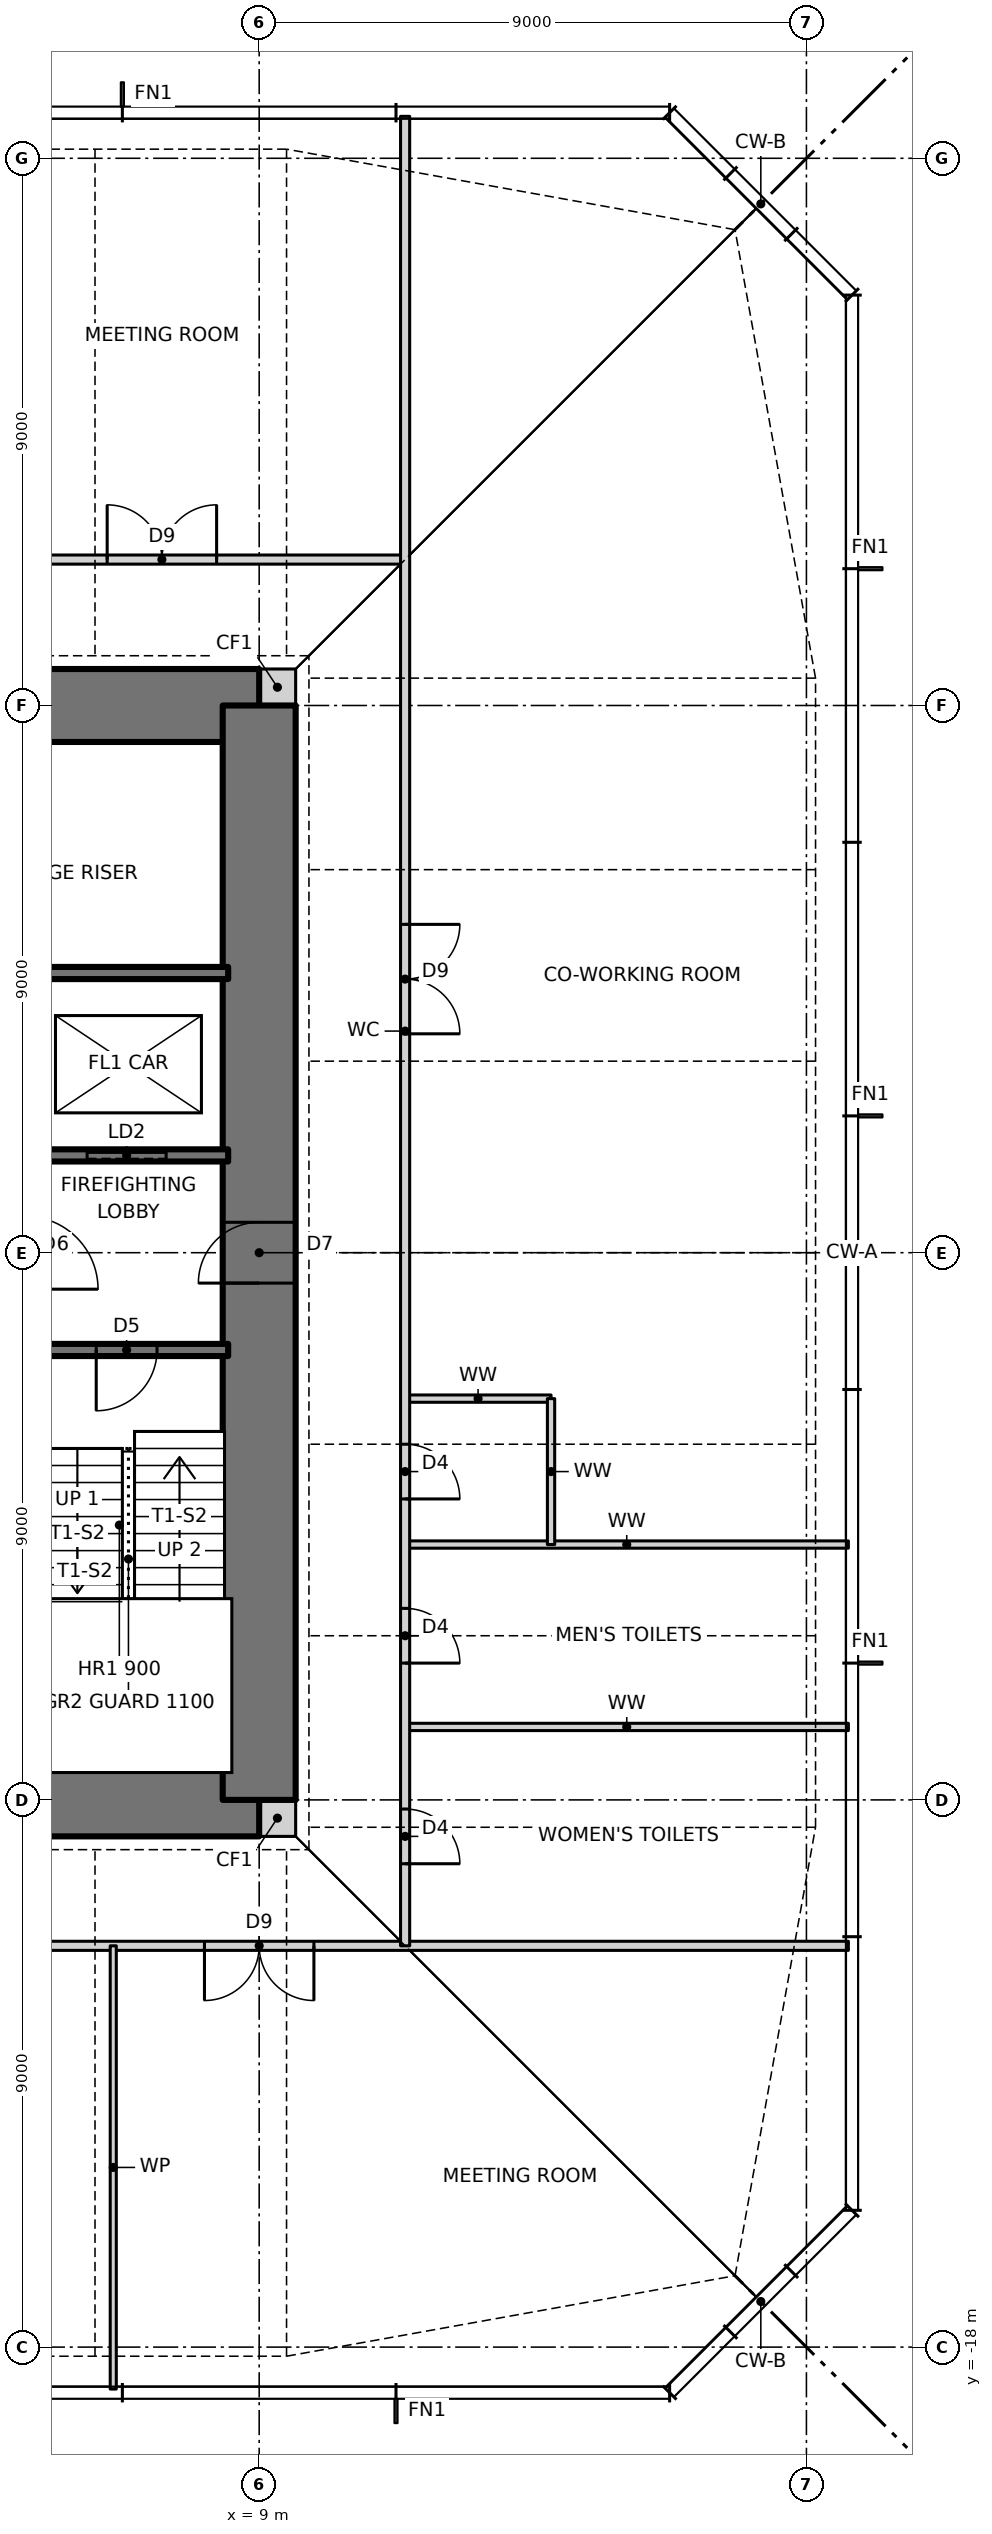
"""IFC4 building model, lengths in metres.
Left out: names, types, materials, properties, quantities, classifications, styles, units other than length and angle.
Written with IfcOpenShell. Run it as: python <this file> out.ifc"""

import sys

from ifc_helpers import new_model, si_unit, direction, frame, frame_2d, origin, place, context, subcontext, project, spatial, rectangle, extrude, element, fill, save


model = new_model("IFC4")
c1 = context("Model", 3, precision=1e-05, world=origin(), true_north=direction((0.0, 1.0)))
c2 = subcontext(c1, "Body", "Model", "MODEL_VIEW")
j1 = project(units=[si_unit("LENGTHUNIT", "METRE"), si_unit("PLANEANGLEUNIT", "RADIAN")], contexts=[c1])
p1 = place(None, origin())
s1 = spatial("IfcSite", under=j1, at=p1, CompositionType="ELEMENT")
p2 = place(p1, origin())
s2 = spatial("IfcBuilding", under=s1, at=p2, CompositionType="ELEMENT")
p3 = place(p2, frame((0.0, 0.0, 149.5)))
s3 = spatial("IfcBuildingStorey", under=s2, at=p3, CompositionType="ELEMENT", Elevation=149.5)
for number, where, z_axis, x_axis in (
    (1, (9.0, -9.3, 0.0), (0.0, 0.0, 1.0), (1.0, 0.0, 0.0)),
    (2, (9.0, 9.3, 0.0), (0.0, 0.0, 1.0), (1.0, 0.0, 0.0)),
):
    element("IfcWall", number, at=place(p3, frame(where, z_axis=z_axis, x_axis=x_axis)), inside=s3, PredefinedType="SOLIDWALL", context=c2, shape_type="SweptSolid", body=[
        extrude(rectangle(XDim=0.6, YDim=0.6, at=frame_2d((0.3, 0.0))), origin(), (0.0, 0.0, 1.0), 3.5),
    ])
p4 = place(p3, frame((-9.0, -9.0, 0.0), z_axis=(0.0, 0.0, 1.0), x_axis=(1.0, 0.0, 0.0)))
e3 = element("IfcWall", 3, at=p4, inside=s3, PredefinedType="SHEAR", context=c2, shape_type="SweptSolid", body=[
    extrude(rectangle(XDim=18.0, YDim=1.2, at=frame_2d((9.0, 0.0))), origin(), (0.0, 0.0, 1.0), 3.5),
])
p5 = place(p4, frame((3.775, 0.0, 0.0)))
e4 = element("IfcOpeningElement", 4, at=p5, cuts=e3, PredefinedType="OPENING", context=c2, shape_type="SweptSolid", body=[
    extrude(rectangle(XDim=0.9, YDim=2.1, at=frame_2d((0.45, 1.05))), frame((0.0, 0.61, 0.0), z_axis=(0.0, -1.0, 0.0), x_axis=(1.0, 0.0, 0.0)), (0.0, 0.0, 1.0), 1.22),
])
p6 = place(p4, frame((10.625, 0.0, 0.0)))
e5 = element("IfcOpeningElement", 5, at=p6, cuts=e3, PredefinedType="OPENING", context=c2, shape_type="SweptSolid", body=[
    extrude(rectangle(XDim=0.9, YDim=2.1, at=frame_2d((0.45, 1.05))), frame((0.0, 0.61, 0.0), z_axis=(0.0, -1.0, 0.0), x_axis=(1.0, 0.0, 0.0)), (0.0, 0.0, 1.0), 1.22),
])
p7 = place(p3, frame((9.0, 9.0, 0.0), z_axis=(0.0, 0.0, 1.0), x_axis=(-1.0, 0.0, 0.0)))
e6 = element("IfcWall", 6, at=p7, inside=s3, PredefinedType="SHEAR", context=c2, shape_type="SweptSolid", body=[
    extrude(rectangle(XDim=18.0, YDim=1.2, at=frame_2d((9.0, 0.0))), origin(), (0.0, 0.0, 1.0), 3.5),
])
p8 = place(p7, frame((11.125, 0.0, 0.0)))
e7 = element("IfcOpeningElement", 7, at=p8, cuts=e6, PredefinedType="OPENING", context=c2, shape_type="SweptSolid", body=[
    extrude(rectangle(XDim=0.9, YDim=2.1, at=frame_2d((0.45, 1.05))), frame((0.0, 0.61, 0.0), z_axis=(0.0, -1.0, 0.0), x_axis=(1.0, 0.0, 0.0)), (0.0, 0.0, 1.0), 1.22),
])
p9 = place(p7, frame((4.275, 0.0, 0.0)))
e8 = element("IfcOpeningElement", 8, at=p9, cuts=e6, PredefinedType="OPENING", context=c2, shape_type="SweptSolid", body=[
    extrude(rectangle(XDim=0.9, YDim=2.1, at=frame_2d((0.45, 1.05))), frame((0.0, 0.61, 0.0), z_axis=(0.0, -1.0, 0.0), x_axis=(1.0, 0.0, 0.0)), (0.0, 0.0, 1.0), 1.22),
])
p10 = place(p3, frame((9.0, -9.0, 0.0), z_axis=(0.0, 0.0, 1.0), x_axis=(0.0, 1.0, 0.0)))
e9 = element("IfcWall", 9, at=p10, inside=s3, PredefinedType="SHEAR", context=c2, shape_type="SweptSolid", body=[
    extrude(rectangle(XDim=18.0, YDim=1.2, at=frame_2d((9.0, 0.0))), origin(), (0.0, 0.0, 1.0), 3.5),
])
p11 = place(p10, frame((8.5, 0.0, 0.0)))
e10 = element("IfcOpeningElement", 10, at=p11, cuts=e9, PredefinedType="OPENING", context=c2, shape_type="SweptSolid", body=[
    extrude(rectangle(XDim=1.0, YDim=2.1, at=frame_2d((0.5, 1.05))), frame((0.0, 0.61, 0.0), z_axis=(0.0, -1.0, 0.0), x_axis=(1.0, 0.0, 0.0)), (0.0, 0.0, 1.0), 1.22),
])
p12 = place(p3, frame((-11.4, -11.4, 0.0), z_axis=(0.0, 0.0, 1.0), x_axis=(1.0, 0.0, 0.0)))
e11 = element("IfcWall", 11, at=p12, inside=s3, PredefinedType="PARTITIONING", context=c2, shape_type="SweptSolid", body=[
    extrude(rectangle(XDim=30.09, YDim=0.15, at=frame_2d((15.045, 0.0))), origin(), (0.0, 0.0, 1.0), 3.27),
])
p13 = place(p12, frame((8.1, 0.0, 0.0)))
e12 = element("IfcOpeningElement", 12, at=p13, cuts=e11, PredefinedType="OPENING", context=c2, shape_type="SweptSolid", body=[
    extrude(rectangle(XDim=1.8, YDim=2.1, at=frame_2d((0.9, 1.05))), frame((0.0, 0.085, 0.0), z_axis=(0.0, -1.0, 0.0), x_axis=(1.0, 0.0, 0.0)), (0.0, 0.0, 1.0), 0.17),
])
p14 = place(p12, frame((19.5, 0.0, 0.0)))
e13 = element("IfcOpeningElement", 13, at=p14, cuts=e11, PredefinedType="OPENING", context=c2, shape_type="SweptSolid", body=[
    extrude(rectangle(XDim=1.8, YDim=2.1, at=frame_2d((0.9, 1.05))), frame((0.0, 0.085, 0.0), z_axis=(0.0, -1.0, 0.0), x_axis=(1.0, 0.0, 0.0)), (0.0, 0.0, 1.0), 0.17),
])
for number, where, z_axis, x_axis in (
    (14, (11.4, -7.8, 0.0), (0.0, 0.0, 1.0), (1.0, 0.0, 0.0)),
    (15, (11.4, -4.8, 0.0), (0.0, 0.0, 1.0), (1.0, 0.0, 0.0)),
):
    element("IfcWall", number, at=place(p3, frame(where, z_axis=z_axis, x_axis=x_axis)), inside=s3, PredefinedType="PARTITIONING", context=c2, shape_type="SweptSolid", body=[
        extrude(rectangle(XDim=7.29, YDim=0.12, at=frame_2d((3.645, 0.0))), origin(), (0.0, 0.0, 1.0), 3.27),
    ])
p15 = place(p3, frame((11.4, -2.4, 0.0), z_axis=(0.0, 0.0, 1.0), x_axis=(1.0, 0.0, 0.0)))
e16 = element("IfcWall", 16, at=p15, inside=s3, PredefinedType="PARTITIONING", context=c2, shape_type="SweptSolid", body=[
    extrude(rectangle(XDim=2.4, YDim=0.12, at=frame_2d((1.2, 0.0))), origin(), (0.0, 0.0, 1.0), 3.27),
])
p16 = place(p3, frame((-8.49, -1.6, 0.0), z_axis=(0.0, 0.0, 1.0), x_axis=(1.0, 0.0, 0.0)))
e17 = element("IfcWall", 17, at=p16, inside=s3, PredefinedType="SOLIDWALL", context=c2, shape_type="SweptSolid", body=[
    extrude(rectangle(XDim=16.98, YDim=0.2, at=frame_2d((8.49, 0.0))), origin(), (0.0, 0.0, 1.0), 3.5),
])
p17 = place(p16, frame((14.81, 0.0, 0.0)))
e18 = element("IfcOpeningElement", 18, at=p17, cuts=e17, PredefinedType="OPENING", context=c2, shape_type="SweptSolid", body=[
    extrude(rectangle(XDim=1.0, YDim=2.1, at=frame_2d((0.5, 1.05))), frame((0.0, 0.11, 0.0), z_axis=(0.0, -1.0, 0.0), x_axis=(1.0, 0.0, 0.0)), (0.0, 0.0, 1.0), 0.22),
])
p18 = place(p16, frame((1.232, 0.0, 0.0)))
e19 = element("IfcOpeningElement", 19, at=p18, cuts=e17, PredefinedType="OPENING", context=c2, shape_type="SweptSolid", body=[
    extrude(rectangle(XDim=0.9, YDim=2.1, at=frame_2d((0.45, 1.05))), frame((0.0, 0.11, 0.0), z_axis=(0.0, -1.0, 0.0), x_axis=(1.0, 0.0, 0.0)), (0.0, 0.0, 1.0), 0.22),
])
p19 = place(p16, frame((4.627, 0.0, 0.0)))
e20 = element("IfcOpeningElement", 20, at=p19, cuts=e17, PredefinedType="OPENING", context=c2, shape_type="SweptSolid", body=[
    extrude(rectangle(XDim=0.9, YDim=2.1, at=frame_2d((0.45, 1.05))), frame((0.0, 0.11, 0.0), z_axis=(0.0, -1.0, 0.0), x_axis=(1.0, 0.0, 0.0)), (0.0, 0.0, 1.0), 0.22),
])
p20 = place(p16, frame((8.052, 0.0, 0.0)))
e21 = element("IfcOpeningElement", 21, at=p20, cuts=e17, PredefinedType="OPENING", context=c2, shape_type="SweptSolid", body=[
    extrude(rectangle(XDim=0.9, YDim=2.1, at=frame_2d((0.45, 1.05))), frame((0.0, 0.11, 0.0), z_axis=(0.0, -1.0, 0.0), x_axis=(1.0, 0.0, 0.0)), (0.0, 0.0, 1.0), 0.22),
])
p21 = place(p16, frame((11.478, 0.0, 0.0)))
e22 = element("IfcOpeningElement", 22, at=p21, cuts=e17, PredefinedType="OPENING", context=c2, shape_type="SweptSolid", body=[
    extrude(rectangle(XDim=0.9, YDim=2.1, at=frame_2d((0.45, 1.05))), frame((0.0, 0.11, 0.0), z_axis=(0.0, -1.0, 0.0), x_axis=(1.0, 0.0, 0.0)), (0.0, 0.0, 1.0), 0.22),
])
p22 = place(p3, frame((-8.49, 1.6, 0.0), z_axis=(0.0, 0.0, 1.0), x_axis=(1.0, 0.0, 0.0)))
e23 = element("IfcWall", 23, at=p22, inside=s3, PredefinedType="SOLIDWALL", context=c2, shape_type="SweptSolid", body=[
    extrude(rectangle(XDim=16.98, YDim=0.2, at=frame_2d((8.49, 0.0))), origin(), (0.0, 0.0, 1.0), 3.5),
])
p23 = place(p22, frame((1.17, 0.0, 0.0)))
e24 = element("IfcOpeningElement", 24, at=p23, cuts=e23, PredefinedType="OPENING", context=c2, shape_type="SweptSolid", body=[
    extrude(rectangle(XDim=1.0, YDim=2.1, at=frame_2d((0.5, 1.05))), frame((0.0, 0.11, 0.0), z_axis=(0.0, -1.0, 0.0), x_axis=(1.0, 0.0, 0.0)), (0.0, 0.0, 1.0), 0.22),
])
p24 = place(p22, frame((4.506, 0.0, 0.0)))
e25 = element("IfcOpeningElement", 25, at=p24, cuts=e23, PredefinedType="OPENING", context=c2, shape_type="SweptSolid", body=[
    extrude(rectangle(XDim=1.1, YDim=2.1, at=frame_2d((0.55, 1.05))), frame((0.0, 0.11, 0.0), z_axis=(0.0, -1.0, 0.0), x_axis=(1.0, 0.0, 0.0)), (0.0, 0.0, 1.0), 0.22),
])
p25 = place(p22, frame((7.94, 0.0, 0.0)))
e26 = element("IfcOpeningElement", 26, at=p25, cuts=e23, PredefinedType="OPENING", context=c2, shape_type="SweptSolid", body=[
    extrude(rectangle(XDim=1.1, YDim=2.1, at=frame_2d((0.55, 1.05))), frame((0.0, 0.11, 0.0), z_axis=(0.0, -1.0, 0.0), x_axis=(1.0, 0.0, 0.0)), (0.0, 0.0, 1.0), 0.22),
])
p26 = place(p22, frame((14.66, 0.0, 0.0)))
e27 = element("IfcOpeningElement", 27, at=p26, cuts=e23, PredefinedType="OPENING", context=c2, shape_type="SweptSolid", body=[
    extrude(rectangle(XDim=1.3, YDim=2.1, at=frame_2d((0.65, 1.05))), frame((0.0, 0.11, 0.0), z_axis=(0.0, -1.0, 0.0), x_axis=(1.0, 0.0, 0.0)), (0.0, 0.0, 1.0), 0.22),
])
p27 = place(p3, frame((5.15, 4.6, 0.0), z_axis=(0.0, 0.0, 1.0), x_axis=(1.0, 0.0, 0.0)))
e28 = element("IfcWall", 28, at=p27, inside=s3, PredefinedType="SOLIDWALL", context=c2, shape_type="SweptSolid", body=[
    extrude(rectangle(XDim=3.34, YDim=0.2, at=frame_2d((1.67, 0.0))), origin(), (0.0, 0.0, 1.0), 3.5),
])
p28 = place(p3, frame((-18.69, 11.4, 0.0), z_axis=(0.0, 0.0, 1.0), x_axis=(1.0, 0.0, 0.0)))
e29 = element("IfcWall", 29, at=p28, inside=s3, PredefinedType="PARTITIONING", context=c2, shape_type="SweptSolid", body=[
    extrude(rectangle(XDim=30.09, YDim=0.15, at=frame_2d((15.045, 0.0))), origin(), (0.0, 0.0, 1.0), 3.27),
])
p29 = place(p28, frame((25.19, 0.0, 0.0)))
e30 = element("IfcOpeningElement", 30, at=p29, cuts=e29, PredefinedType="OPENING", context=c2, shape_type="SweptSolid", body=[
    extrude(rectangle(XDim=1.8, YDim=2.1, at=frame_2d((0.9, 1.05))), frame((0.0, 0.085, 0.0), z_axis=(0.0, -1.0, 0.0), x_axis=(1.0, 0.0, 0.0)), (0.0, 0.0, 1.0), 0.17),
])
p30 = place(p28, frame((17.19, 0.0, 0.0)))
e31 = element("IfcOpeningElement", 31, at=p30, cuts=e29, PredefinedType="OPENING", context=c2, shape_type="SweptSolid", body=[
    extrude(rectangle(XDim=1.8, YDim=2.1, at=frame_2d((0.9, 1.05))), frame((0.0, 0.085, 0.0), z_axis=(0.0, -1.0, 0.0), x_axis=(1.0, 0.0, 0.0)), (0.0, 0.0, 1.0), 0.17),
])
p31 = place(p28, frame((9.79, 0.0, 0.0)))
e32 = element("IfcOpeningElement", 32, at=p31, cuts=e29, PredefinedType="OPENING", context=c2, shape_type="SweptSolid", body=[
    extrude(rectangle(XDim=1.8, YDim=2.1, at=frame_2d((0.9, 1.05))), frame((0.0, 0.085, 0.0), z_axis=(0.0, -1.0, 0.0), x_axis=(1.0, 0.0, 0.0)), (0.0, 0.0, 1.0), 0.17),
])
p32 = place(p3, frame((13.8, -4.8, 0.0), z_axis=(0.0, 0.0, 1.0), x_axis=(0.0, 1.0, 0.0)))
e33 = element("IfcWall", 33, at=p32, inside=s3, PredefinedType="PARTITIONING", context=c2, shape_type="SweptSolid", body=[
    extrude(rectangle(XDim=2.4, YDim=0.12, at=frame_2d((1.2, 0.0))), origin(), (0.0, 0.0, 1.0), 3.27),
])
p33 = place(p3, frame((11.4, -11.4, 0.0), z_axis=(0.0, 0.0, 1.0), x_axis=(0.0, 1.0, 0.0)))
e34 = element("IfcWall", 34, at=p33, inside=s3, PredefinedType="PARTITIONING", context=c2, shape_type="SweptSolid", body=[
    extrude(rectangle(XDim=30.09, YDim=0.15, at=frame_2d((15.045, 0.0))), origin(), (0.0, 0.0, 1.0), 3.27),
])
p34 = place(p33, frame((1.35, 0.0, 0.0)))
e35 = element("IfcOpeningElement", 35, at=p34, cuts=e34, PredefinedType="OPENING", context=c2, shape_type="SweptSolid", body=[
    extrude(rectangle(XDim=0.9, YDim=2.1, at=frame_2d((0.45, 1.05))), frame((0.0, 0.085, 0.0), z_axis=(0.0, -1.0, 0.0), x_axis=(1.0, 0.0, 0.0)), (0.0, 0.0, 1.0), 0.17),
])
p35 = place(p33, frame((4.65, 0.0, 0.0)))
e36 = element("IfcOpeningElement", 36, at=p35, cuts=e34, PredefinedType="OPENING", context=c2, shape_type="SweptSolid", body=[
    extrude(rectangle(XDim=0.9, YDim=2.1, at=frame_2d((0.45, 1.05))), frame((0.0, 0.085, 0.0), z_axis=(0.0, -1.0, 0.0), x_axis=(1.0, 0.0, 0.0)), (0.0, 0.0, 1.0), 0.17),
])
p36 = place(p33, frame((7.35, 0.0, 0.0)))
e37 = element("IfcOpeningElement", 37, at=p36, cuts=e34, PredefinedType="OPENING", context=c2, shape_type="SweptSolid", body=[
    extrude(rectangle(XDim=0.9, YDim=2.1, at=frame_2d((0.45, 1.05))), frame((0.0, 0.085, 0.0), z_axis=(0.0, -1.0, 0.0), x_axis=(1.0, 0.0, 0.0)), (0.0, 0.0, 1.0), 0.17),
])
p37 = place(p33, frame((15.0, 0.0, 0.0)))
e38 = element("IfcOpeningElement", 38, at=p37, cuts=e34, PredefinedType="OPENING", context=c2, shape_type="SweptSolid", body=[
    extrude(rectangle(XDim=1.8, YDim=2.1, at=frame_2d((0.9, 1.05))), frame((0.0, 0.085, 0.0), z_axis=(0.0, -1.0, 0.0), x_axis=(1.0, 0.0, 0.0)), (0.0, 0.0, 1.0), 0.17),
])
p38 = place(p3, frame((6.6, -18.69, 0.0), z_axis=(0.0, 0.0, 1.0), x_axis=(0.0, 1.0, 0.0)))
e39 = element("IfcWall", 39, at=p38, inside=s3, PredefinedType="PARTITIONING", context=c2, shape_type="SweptSolid", body=[
    extrude(rectangle(XDim=7.29, YDim=0.1, at=frame_2d((3.645, 0.0))), origin(), (0.0, 0.0, 1.0), 3.27),
])
p39 = place(p17, frame((1.0, 0.0, 0.0), z_axis=(0.0, 0.0, 1.0), x_axis=(-1.0, 0.0, 0.0)))
e40 = element("IfcDoor", 40, at=p39, inside=s3, OperationType="SINGLE_SWING_RIGHT", PredefinedType="DOOR", context=c2, shape_type="SweptSolid", body=[
    extrude(rectangle(XDim=1.0, YDim=2.1, at=frame_2d((0.5, 1.05))), frame((0.0, 0.025, 0.0), z_axis=(0.0, -1.0, 0.0), x_axis=(1.0, 0.0, 0.0)), (0.0, 0.0, 1.0), 0.05),
])
fill(e18, e40)
p40 = place(p14, frame((1.8, 0.0, 0.0), z_axis=(0.0, 0.0, 1.0), x_axis=(-1.0, 0.0, 0.0)))
e41 = element("IfcDoor", 41, at=p40, inside=s3, OperationType="DOUBLE_DOOR_SINGLE_SWING", PredefinedType="DOOR", context=c2, shape_type="SweptSolid", body=[
    extrude(rectangle(XDim=1.8, YDim=2.1, at=frame_2d((0.9, 1.05))), frame((0.0, 0.025, 0.0), z_axis=(0.0, -1.0, 0.0), x_axis=(1.0, 0.0, 0.0)), (0.0, 0.0, 1.0), 0.05),
])
fill(e13, e41)
p41 = place(p34, frame((0.9, 0.0, 0.0), z_axis=(0.0, 0.0, 1.0), x_axis=(-1.0, 0.0, 0.0)))
e42 = element("IfcDoor", 42, at=p41, inside=s3, OperationType="SINGLE_SWING_RIGHT", PredefinedType="DOOR", context=c2, shape_type="SweptSolid", body=[
    extrude(rectangle(XDim=0.9, YDim=2.1, at=frame_2d((0.45, 1.05))), frame((0.0, 0.025, 0.0), z_axis=(0.0, -1.0, 0.0), x_axis=(1.0, 0.0, 0.0)), (0.0, 0.0, 1.0), 0.05),
])
fill(e35, e42)
p42 = place(p35, frame((0.9, 0.0, 0.0), z_axis=(0.0, 0.0, 1.0), x_axis=(-1.0, 0.0, 0.0)))
e43 = element("IfcDoor", 43, at=p42, inside=s3, OperationType="SINGLE_SWING_RIGHT", PredefinedType="DOOR", context=c2, shape_type="SweptSolid", body=[
    extrude(rectangle(XDim=0.9, YDim=2.1, at=frame_2d((0.45, 1.05))), frame((0.0, 0.025, 0.0), z_axis=(0.0, -1.0, 0.0), x_axis=(1.0, 0.0, 0.0)), (0.0, 0.0, 1.0), 0.05),
])
fill(e36, e43)
p43 = place(p36, frame((0.9, 0.0, 0.0), z_axis=(0.0, 0.0, 1.0), x_axis=(-1.0, 0.0, 0.0)))
e44 = element("IfcDoor", 44, at=p43, inside=s3, OperationType="SINGLE_SWING_RIGHT", PredefinedType="DOOR", context=c2, shape_type="SweptSolid", body=[
    extrude(rectangle(XDim=0.9, YDim=2.1, at=frame_2d((0.45, 1.05))), frame((0.0, 0.025, 0.0), z_axis=(0.0, -1.0, 0.0), x_axis=(1.0, 0.0, 0.0)), (0.0, 0.0, 1.0), 0.05),
])
fill(e37, e44)
p44 = place(p37, frame((1.8, 0.0, 0.0), z_axis=(0.0, 0.0, 1.0), x_axis=(-1.0, 0.0, 0.0)))
e45 = element("IfcDoor", 45, at=p44, inside=s3, OperationType="DOUBLE_DOOR_SINGLE_SWING", PredefinedType="DOOR", context=c2, shape_type="SweptSolid", body=[
    extrude(rectangle(XDim=1.8, YDim=2.1, at=frame_2d((0.9, 1.05))), frame((0.0, 0.025, 0.0), z_axis=(0.0, -1.0, 0.0), x_axis=(1.0, 0.0, 0.0)), (0.0, 0.0, 1.0), 0.05),
])
fill(e38, e45)
p45 = place(p29, origin())
e46 = element("IfcDoor", 46, at=p45, inside=s3, OperationType="DOUBLE_DOOR_SINGLE_SWING", PredefinedType="DOOR", context=c2, shape_type="SweptSolid", body=[
    extrude(rectangle(XDim=1.8, YDim=2.1, at=frame_2d((0.9, 1.05))), frame((0.0, 0.025, 0.0), z_axis=(0.0, -1.0, 0.0), x_axis=(1.0, 0.0, 0.0)), (0.0, 0.0, 1.0), 0.05),
])
fill(e30, e46)
p46 = place(p11, origin())
e47 = element("IfcDoor", 47, at=p46, inside=s3, OperationType="SINGLE_SWING_LEFT", PredefinedType="DOOR", context=c2, shape_type="SweptSolid", body=[
    extrude(rectangle(XDim=1.0, YDim=2.1, at=frame_2d((0.5, 1.05))), frame((0.0, 0.025, 0.0), z_axis=(0.0, -1.0, 0.0), x_axis=(1.0, 0.0, 0.0)), (0.0, 0.0, 1.0), 0.05),
])
fill(e10, e47)
p47 = place(p26, origin())
e48 = element("IfcDoor", 48, at=p47, inside=s3, OperationType="SLIDING_TO_LEFT", PredefinedType="DOOR", context=c2, shape_type="SweptSolid", body=[
    extrude(rectangle(XDim=1.3, YDim=2.1, at=frame_2d((0.65, 1.05))), frame((0.0, 0.025, 0.0), z_axis=(0.0, -1.0, 0.0), x_axis=(1.0, 0.0, 0.0)), (0.0, 0.0, 1.0), 0.05),
])
fill(e27, e48)
save(model, sys.argv[1])
